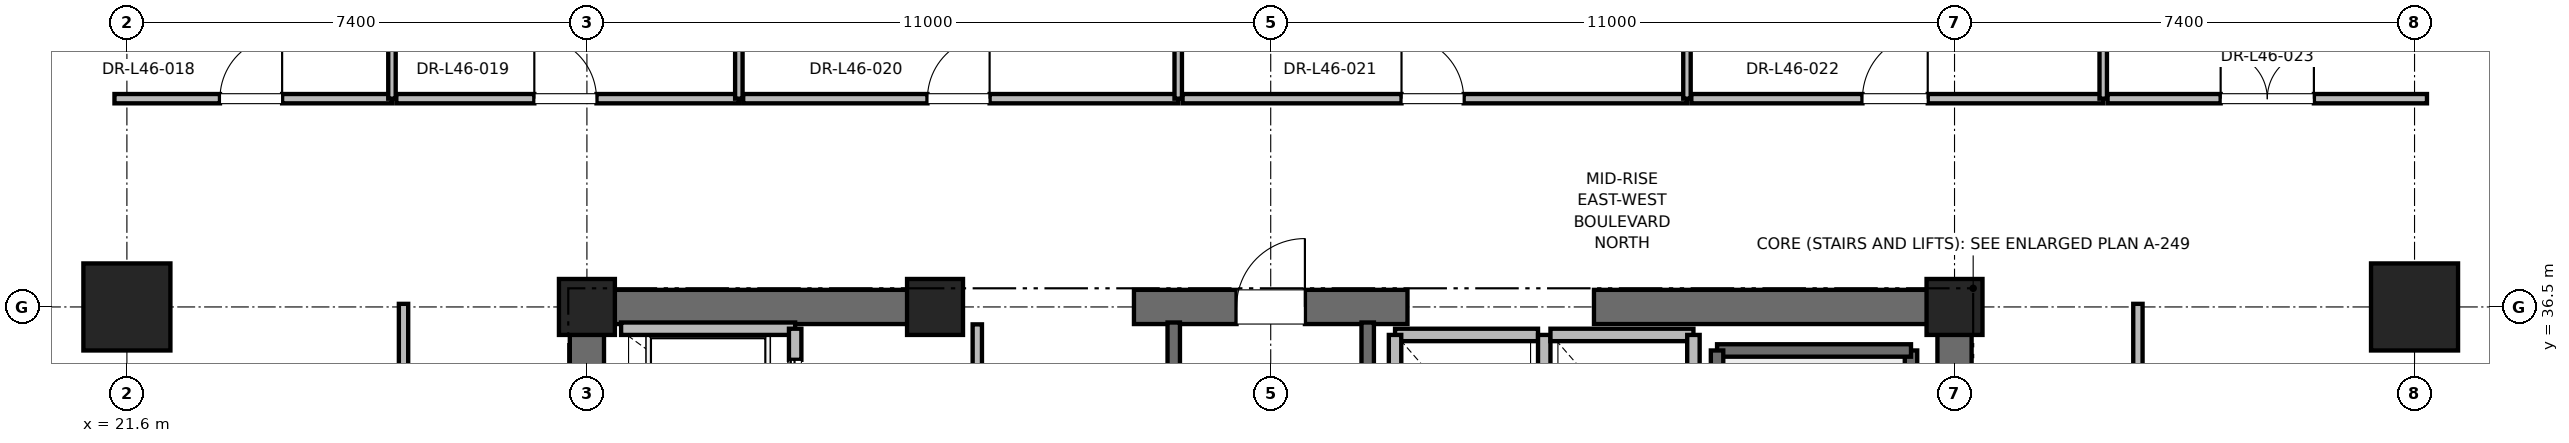
"""IFC4 building model, lengths in metres.
Left out: names, types, materials, properties, quantities, classifications, styles, units other than length and angle.
Written with IfcOpenShell. Run it as: python <this file> out.ifc"""

import sys

from ifc_helpers import new_model, si_unit, direction, frame, frame_2d, origin, origin_2d, place, context, subcontext, project, spatial, rectangle, extrude, element, fill, save


model = new_model("IFC4")
c1 = context("Model", 3, precision=1e-05, world=origin(), true_north=direction((0.0, 1.0)))
c2 = subcontext(c1, "Body", "Model", "MODEL_VIEW")
j1 = project(units=[si_unit("LENGTHUNIT", "METRE"), si_unit("PLANEANGLEUNIT", "RADIAN")], contexts=[c1])
p1 = place(None, origin())
s1 = spatial("IfcSite", under=j1, at=p1, CompositionType="ELEMENT")
p2 = place(p1, origin())
s2 = spatial("IfcBuilding", under=s1, at=p2, CompositionType="ELEMENT")
p3 = place(p2, frame((0.0, 0.0, 200.2)))
s3 = spatial("IfcBuildingStorey", under=s2, at=p3, CompositionType="ELEMENT", Elevation=200.2)
for number, where, z_axis, x_axis in (
    (1, (21.6, 36.5, 0.0), (0.0, 0.0, 1.0), (1.0, 0.0, 0.0)),
    (2, (58.4, 36.5, 0.0), (0.0, 0.0, 1.0), (1.0, 0.0, 0.0)),
):
    element("IfcColumn", number, at=place(p3, frame(where, z_axis=z_axis, x_axis=x_axis)), inside=s3, PredefinedType="COLUMN", context=c2, shape_type="SweptSolid", body=[
        extrude(rectangle(XDim=1.4, YDim=1.4, at=origin_2d()), origin(), (0.0, 0.0, 1.0), 5.0),
    ])
for number, where, z_axis, x_axis in (
    (3, (29.0, 36.5, 0.0), (0.0, 0.0, 1.0), (1.0, 0.0, 0.0)),
    (4, (51.0, 36.5, 0.0), (0.0, 0.0, 1.0), (1.0, 0.0, 0.0)),
    (5, (34.6, 36.5, 0.0), (0.0, 0.0, 1.0), (1.0, 0.0, 0.0)),
):
    element("IfcColumn", number, at=place(p3, frame(where, z_axis=z_axis, x_axis=x_axis)), inside=s3, PredefinedType="PILASTER", context=c2, shape_type="SweptSolid", body=[
        extrude(rectangle(XDim=0.9, YDim=0.9, at=origin_2d()), origin(), (0.0, 0.0, 1.0), 5.0),
    ])
p4 = place(p3, frame((29.0, 36.5, 0.0), z_axis=(0.0, 0.0, 1.0), x_axis=(1.0, 0.0, 0.0)))
e6 = element("IfcWall", 6, at=p4, inside=s3, PredefinedType="SHEAR", context=c2, shape_type="SweptSolid", body=[
    extrude(rectangle(XDim=5.8, YDim=0.55, at=frame_2d((2.9, 0.0))), origin(), (0.0, 0.0, 1.0), 4.775),
])
p5 = place(p3, frame((37.8, 36.5, 0.0), z_axis=(0.0, 0.0, 1.0), x_axis=(1.0, 0.0, 0.0)))
e7 = element("IfcWall", 7, at=p5, inside=s3, PredefinedType="SHEAR", context=c2, shape_type="SweptSolid", body=[
    extrude(rectangle(XDim=4.4, YDim=0.55, at=frame_2d((2.2, 0.0))), origin(), (0.0, 0.0, 1.0), 4.775),
])
p6 = place(p5, frame((1.65, 0.0, 0.0)))
e8 = element("IfcOpeningElement", 8, at=p6, cuts=e7, PredefinedType="OPENING", context=c2, shape_type="SweptSolid", body=[
    extrude(rectangle(XDim=1.1, YDim=2.15, at=frame_2d((0.55, 1.075))), frame((0.0, 0.275, 0.0), z_axis=(0.0, -1.0, 0.0), x_axis=(1.0, 0.0, 0.0)), (0.0, 0.0, 1.0), 0.55),
])
for number, where, z_axis, x_axis in (
    (9, (45.2, 36.5, 0.0), (0.0, 0.0, 1.0), (1.0, 0.0, 0.0)),
    (10, (29.0, 30.7, 0.0), (0.0, 0.0, 1.0), (0.0, 1.0, 0.0)),
):
    element("IfcWall", number, at=place(p3, frame(where, z_axis=z_axis, x_axis=x_axis)), inside=s3, PredefinedType="SHEAR", context=c2, shape_type="SweptSolid", body=[
        extrude(rectangle(XDim=5.8, YDim=0.55, at=frame_2d((2.9, 0.0))), origin(), (0.0, 0.0, 1.0), 4.775),
    ])
p7 = place(p3, frame((51.0, 27.7, 0.0), z_axis=(0.0, 0.0, 1.0), x_axis=(0.0, 1.0, 0.0)))
e11 = element("IfcWall", 11, at=p7, inside=s3, PredefinedType="SHEAR", context=c2, shape_type="SweptSolid", body=[
    extrude(rectangle(XDim=8.8, YDim=0.55, at=frame_2d((4.4, 0.0))), origin(), (0.0, 0.0, 1.0), 4.775),
])
p8 = place(p3, frame((50.3, 27.65, 0.0), z_axis=(0.0, 0.0, 1.0), x_axis=(0.0, 1.0, 0.0)))
e12 = element("IfcWall", 12, at=p8, inside=s3, PredefinedType="SOLIDWALL", context=c2, shape_type="SweptSolid", body=[
    extrude(rectangle(XDim=8.15, YDim=0.2, at=frame_2d((4.075, 0.0))), origin(), (0.0, 0.0, 1.0), 4.775),
])
p9 = place(p3, frame((47.18, 35.8, 0.0), z_axis=(0.0, 0.0, 1.0), x_axis=(1.0, 0.0, 0.0)))
e13 = element("IfcWall", 13, at=p9, inside=s3, PredefinedType="SOLIDWALL", context=c2, shape_type="SweptSolid", body=[
    extrude(rectangle(XDim=3.12, YDim=0.2, at=frame_2d((1.56, 0.0))), origin(), (0.0, 0.0, 1.0), 4.775),
])
p10 = place(p3, frame((47.18, 27.62, 0.0), z_axis=(0.0, 0.0, 1.0), x_axis=(0.0, 1.0, 0.0)))
e14 = element("IfcWall", 14, at=p10, inside=s3, PredefinedType="SOLIDWALL", context=c2, shape_type="SweptSolid", body=[
    extrude(rectangle(XDim=8.18, YDim=0.2, at=frame_2d((4.09, 0.0))), origin(), (0.0, 0.0, 1.0), 4.775),
])
p11 = place(p3, frame((38.44, 27.38, 0.0), z_axis=(0.0, 0.0, 1.0), x_axis=(0.0, 1.0, 0.0)))
e15 = element("IfcWall", 15, at=p11, inside=s3, PredefinedType="SOLIDWALL", context=c2, shape_type="SweptSolid", body=[
    extrude(rectangle(XDim=8.87, YDim=0.2, at=frame_2d((4.435, 0.0))), origin(), (0.0, 0.0, 1.0), 4.775),
])
p12 = place(p3, frame((41.56, 27.68, 0.0), z_axis=(0.0, 0.0, 1.0), x_axis=(0.0, 1.0, 0.0)))
e16 = element("IfcWall", 16, at=p12, inside=s3, PredefinedType="SOLIDWALL", context=c2, shape_type="SweptSolid", body=[
    extrude(rectangle(XDim=8.57, YDim=0.2, at=frame_2d((4.285, 0.0))), origin(), (0.0, 0.0, 1.0), 4.775),
])
p13 = place(p3, frame((32.35, 36.15, 0.0), z_axis=(0.0, 0.0, 1.0), x_axis=(-1.0, 0.0, 0.0)))
e17 = element("IfcWall", 17, at=p13, inside=s3, PredefinedType="SOLIDWALL", context=c2, shape_type="SweptSolid", body=[
    extrude(rectangle(XDim=2.8, YDim=0.2, at=frame_2d((1.4, 0.0))), origin(), (0.0, 0.0, 1.0), 4.062),
])
p14 = place(p3, frame((32.35, 34.05, 0.0), z_axis=(0.0, 0.0, 1.0), x_axis=(0.0, 1.0, 0.0)))
e18 = element("IfcWall", 18, at=p14, inside=s3, PredefinedType="SOLIDWALL", context=c2, shape_type="SweptSolid", body=[
    extrude(rectangle(XDim=2.1, YDim=0.2, at=frame_2d((1.05, 0.0))), origin(), (0.0, 0.0, 1.0), 4.775),
])
p15 = place(p14, frame((0.5, 0.0, 0.0)))
e19 = element("IfcOpeningElement", 19, at=p15, cuts=e18, PredefinedType="OPENING", context=c2, shape_type="SweptSolid", body=[
    extrude(rectangle(XDim=1.1, YDim=2.2, at=frame_2d((0.55, 1.1))), frame((0.0, 0.1, 0.0), z_axis=(0.0, -1.0, 0.0), x_axis=(1.0, 0.0, 0.0)), (0.0, 0.0, 1.0), 0.2),
])
p16 = place(p3, frame((44.3, 36.05, 0.0), z_axis=(0.0, 0.0, 1.0), x_axis=(-1.0, 0.0, 0.0)))
e20 = element("IfcWall", 20, at=p16, inside=s3, PredefinedType="SOLIDWALL", context=c2, shape_type="SweptSolid", body=[
    extrude(rectangle(XDim=2.3, YDim=0.2, at=frame_2d((1.15, 0.0))), origin(), (0.0, 0.0, 1.0), 3.755),
])
for number, where, z_axis, x_axis in (
    (21, (42.0, 36.05, 0.0), (0.0, 0.0, 1.0), (0.0, -1.0, 0.0)),
    (22, (44.4, 33.45, 0.0), (0.0, 0.0, 1.0), (0.0, 1.0, 0.0)),
):
    element("IfcWall", number, at=place(p3, frame(where, z_axis=z_axis, x_axis=x_axis)), inside=s3, PredefinedType="SOLIDWALL", context=c2, shape_type="SweptSolid", body=[
        extrude(rectangle(XDim=2.6, YDim=0.2, at=frame_2d((1.3, 0.0))), origin(), (0.0, 0.0, 1.0), 3.755),
    ])
p17 = place(p3, frame((46.8, 36.05, 0.0), z_axis=(0.0, 0.0, 1.0), x_axis=(-1.0, 0.0, 0.0)))
e23 = element("IfcWall", 23, at=p17, inside=s3, PredefinedType="SOLIDWALL", context=c2, shape_type="SweptSolid", body=[
    extrude(rectangle(XDim=2.3, YDim=0.2, at=frame_2d((1.15, 0.0))), origin(), (0.0, 0.0, 1.0), 3.755),
])
p18 = place(p3, frame((46.8, 33.45, 0.0), z_axis=(0.0, 0.0, 1.0), x_axis=(0.0, 1.0, 0.0)))
e24 = element("IfcWall", 24, at=p18, inside=s3, PredefinedType="SOLIDWALL", context=c2, shape_type="SweptSolid", body=[
    extrude(rectangle(XDim=2.6, YDim=0.2, at=frame_2d((1.3, 0.0))), origin(), (0.0, 0.0, 1.0), 4.775),
])
p19 = place(p3, frame((35.28, 33.95, 0.0), z_axis=(0.0, 0.0, 1.0), x_axis=(0.0, 1.0, 0.0)))
e25 = element("IfcWall", 25, at=p19, inside=s3, PredefinedType="PARTITIONING", context=c2, shape_type="SweptSolid", body=[
    extrude(rectangle(XDim=2.27, YDim=0.15, at=frame_2d((1.135, 0.0))), origin(), (0.0, 0.0, 1.0), 2.85),
])
p20 = place(p19, frame((0.66, 0.0, 0.0)))
e26 = element("IfcOpeningElement", 26, at=p20, cuts=e25, PredefinedType="OPENING", context=c2, shape_type="SweptSolid", body=[
    extrude(rectangle(XDim=0.95, YDim=2.15, at=frame_2d((0.475, 1.075))), frame((0.0, 0.075, 0.0), z_axis=(0.0, -1.0, 0.0), x_axis=(1.0, 0.0, 0.0)), (0.0, 0.0, 1.0), 0.15),
])
p21 = place(p3, frame((21.4, 39.85, 0.0), z_axis=(0.0, 0.0, 1.0), x_axis=(1.0, 0.0, 0.0)))
e27 = element("IfcWall", 27, at=p21, inside=s3, PredefinedType="PARTITIONING", context=c2, shape_type="SweptSolid", body=[
    extrude(rectangle(XDim=4.464, YDim=0.15, at=frame_2d((2.232, 0.0))), origin(), (0.0, 0.0, 1.0), 2.85),
])
p22 = place(p21, frame((1.697, 0.0, 0.0)))
e28 = element("IfcOpeningElement", 28, at=p22, cuts=e27, PredefinedType="OPENING", context=c2, shape_type="SweptSolid", body=[
    extrude(rectangle(XDim=1.0, YDim=2.15, at=frame_2d((0.5, 1.075))), frame((0.0, 0.075, 0.0), z_axis=(0.0, -1.0, 0.0), x_axis=(1.0, 0.0, 0.0)), (0.0, 0.0, 1.0), 0.15),
])
p23 = place(p3, frame((25.864, 39.85, 0.0), z_axis=(0.0, 0.0, 1.0), x_axis=(0.0, 1.0, 0.0)))
e29 = element("IfcWall", 29, at=p23, inside=s3, PredefinedType="PARTITIONING", context=c2, shape_type="SweptSolid", body=[
    extrude(rectangle(XDim=7.75, YDim=0.12, at=frame_2d((3.875, 0.0))), origin(), (0.0, 0.0, 1.0), 2.85),
])
p24 = place(p3, frame((25.934, 39.85, 0.0), z_axis=(0.0, 0.0, 1.0), x_axis=(1.0, 0.0, 0.0)))
e30 = element("IfcWall", 30, at=p24, inside=s3, PredefinedType="PARTITIONING", context=c2, shape_type="SweptSolid", body=[
    extrude(rectangle(XDim=5.51, YDim=0.15, at=frame_2d((2.755, 0.0))), origin(), (0.0, 0.0, 1.0), 2.85),
])
p25 = place(p24, frame((2.22, 0.0, 0.0)))
e31 = element("IfcOpeningElement", 31, at=p25, cuts=e30, PredefinedType="OPENING", context=c2, shape_type="SweptSolid", body=[
    extrude(rectangle(XDim=1.0, YDim=2.15, at=frame_2d((0.5, 1.075))), frame((0.0, 0.075, 0.0), z_axis=(0.0, -1.0, 0.0), x_axis=(1.0, 0.0, 0.0)), (0.0, 0.0, 1.0), 0.15),
])
p26 = place(p3, frame((31.444, 39.85, 0.0), z_axis=(0.0, 0.0, 1.0), x_axis=(0.0, 1.0, 0.0)))
e32 = element("IfcWall", 32, at=p26, inside=s3, PredefinedType="PARTITIONING", context=c2, shape_type="SweptSolid", body=[
    extrude(rectangle(XDim=7.75, YDim=0.12, at=frame_2d((3.875, 0.0))), origin(), (0.0, 0.0, 1.0), 2.85),
])
p27 = place(p3, frame((31.514, 39.85, 0.0), z_axis=(0.0, 0.0, 1.0), x_axis=(1.0, 0.0, 0.0)))
e33 = element("IfcWall", 33, at=p27, inside=s3, PredefinedType="PARTITIONING", context=c2, shape_type="SweptSolid", body=[
    extrude(rectangle(XDim=6.998, YDim=0.15, at=frame_2d((3.499, 0.0))), origin(), (0.0, 0.0, 1.0), 2.85),
])
p28 = place(p27, frame((2.964, 0.0, 0.0)))
e34 = element("IfcOpeningElement", 34, at=p28, cuts=e33, PredefinedType="OPENING", context=c2, shape_type="SweptSolid", body=[
    extrude(rectangle(XDim=1.0, YDim=2.15, at=frame_2d((0.5, 1.075))), frame((0.0, 0.075, 0.0), z_axis=(0.0, -1.0, 0.0), x_axis=(1.0, 0.0, 0.0)), (0.0, 0.0, 1.0), 0.15),
])
p29 = place(p3, frame((38.512, 39.85, 0.0), z_axis=(0.0, 0.0, 1.0), x_axis=(0.0, 1.0, 0.0)))
e35 = element("IfcWall", 35, at=p29, inside=s3, PredefinedType="PARTITIONING", context=c2, shape_type="SweptSolid", body=[
    extrude(rectangle(XDim=7.75, YDim=0.12, at=frame_2d((3.875, 0.0))), origin(), (0.0, 0.0, 1.0), 2.85),
])
p30 = place(p3, frame((38.582, 39.85, 0.0), z_axis=(0.0, 0.0, 1.0), x_axis=(1.0, 0.0, 0.0)))
e36 = element("IfcWall", 36, at=p30, inside=s3, PredefinedType="PARTITIONING", context=c2, shape_type="SweptSolid", body=[
    extrude(rectangle(XDim=8.114, YDim=0.15, at=frame_2d((4.057, 0.0))), origin(), (0.0, 0.0, 1.0), 2.85),
])
p31 = place(p30, frame((3.522, 0.0, 0.0)))
e37 = element("IfcOpeningElement", 37, at=p31, cuts=e36, PredefinedType="OPENING", context=c2, shape_type="SweptSolid", body=[
    extrude(rectangle(XDim=1.0, YDim=2.15, at=frame_2d((0.5, 1.075))), frame((0.0, 0.075, 0.0), z_axis=(0.0, -1.0, 0.0), x_axis=(1.0, 0.0, 0.0)), (0.0, 0.0, 1.0), 0.15),
])
p32 = place(p3, frame((46.696, 39.85, 0.0), z_axis=(0.0, 0.0, 1.0), x_axis=(0.0, 1.0, 0.0)))
e38 = element("IfcWall", 38, at=p32, inside=s3, PredefinedType="PARTITIONING", context=c2, shape_type="SweptSolid", body=[
    extrude(rectangle(XDim=7.75, YDim=0.12, at=frame_2d((3.875, 0.0))), origin(), (0.0, 0.0, 1.0), 2.85),
])
p33 = place(p3, frame((46.766, 39.85, 0.0), z_axis=(0.0, 0.0, 1.0), x_axis=(1.0, 0.0, 0.0)))
e39 = element("IfcWall", 39, at=p33, inside=s3, PredefinedType="PARTITIONING", context=c2, shape_type="SweptSolid", body=[
    extrude(rectangle(XDim=6.626, YDim=0.15, at=frame_2d((3.313, 0.0))), origin(), (0.0, 0.0, 1.0), 2.85),
])
p34 = place(p33, frame((2.753, 0.0, 0.0)))
e40 = element("IfcOpeningElement", 40, at=p34, cuts=e39, PredefinedType="OPENING", context=c2, shape_type="SweptSolid", body=[
    extrude(rectangle(XDim=1.05, YDim=2.2, at=frame_2d((0.525, 1.1))), frame((0.0, 0.075, 0.0), z_axis=(0.0, -1.0, 0.0), x_axis=(1.0, 0.0, 0.0)), (0.0, 0.0, 1.0), 0.15),
])
p35 = place(p3, frame((53.392, 39.85, 0.0), z_axis=(0.0, 0.0, 1.0), x_axis=(0.0, 1.0, 0.0)))
e41 = element("IfcWall", 41, at=p35, inside=s3, PredefinedType="PARTITIONING", context=c2, shape_type="SweptSolid", body=[
    extrude(rectangle(XDim=7.75, YDim=0.12, at=frame_2d((3.875, 0.0))), origin(), (0.0, 0.0, 1.0), 2.85),
])
p36 = place(p3, frame((53.462, 39.85, 0.0), z_axis=(0.0, 0.0, 1.0), x_axis=(1.0, 0.0, 0.0)))
e42 = element("IfcWall", 42, at=p36, inside=s3, PredefinedType="PARTITIONING", context=c2, shape_type="SweptSolid", body=[
    extrude(rectangle(XDim=5.138, YDim=0.15, at=frame_2d((2.569, 0.0))), origin(), (0.0, 0.0, 1.0), 2.85),
])
p37 = place(p36, frame((1.819, 0.0, 0.0)))
e43 = element("IfcOpeningElement", 43, at=p37, cuts=e42, PredefinedType="OPENING", context=c2, shape_type="SweptSolid", body=[
    extrude(rectangle(XDim=1.5, YDim=2.25, at=frame_2d((0.75, 1.125))), frame((0.0, 0.075, 0.0), z_axis=(0.0, -1.0, 0.0), x_axis=(1.0, 0.0, 0.0)), (0.0, 0.0, 1.0), 0.15),
])
p38 = place(p3, frame((26.05, 30.647, 0.0), z_axis=(0.0, 0.0, 1.0), x_axis=(0.0, 1.0, 0.0)))
e44 = element("IfcWall", 44, at=p38, inside=s3, PredefinedType="PARTITIONING", context=c2, shape_type="SweptSolid", body=[
    extrude(rectangle(XDim=5.903, YDim=0.15, at=frame_2d((2.952, 0.0))), origin(), (0.0, 0.0, 1.0), 2.85),
])
p39 = place(p38, frame((2.126, 0.0, 0.0)))
e45 = element("IfcOpeningElement", 45, at=p39, cuts=e44, PredefinedType="OPENING", context=c2, shape_type="SweptSolid", body=[
    extrude(rectangle(XDim=1.5, YDim=2.25, at=frame_2d((0.75, 1.125))), frame((0.0, 0.075, 0.0), z_axis=(0.0, -1.0, 0.0), x_axis=(1.0, 0.0, 0.0)), (0.0, 0.0, 1.0), 0.15),
])
p40 = place(p3, frame((53.95, 32.819, 0.0), z_axis=(0.0, 0.0, 1.0), x_axis=(0.0, 1.0, 0.0)))
e46 = element("IfcWall", 46, at=p40, inside=s3, PredefinedType="PARTITIONING", context=c2, shape_type="SweptSolid", body=[
    extrude(rectangle(XDim=3.731, YDim=0.15, at=frame_2d((1.865, 0.0))), origin(), (0.0, 0.0, 1.0), 2.85),
])
p41 = place(p40, frame((1.291, 0.0, 0.0)))
e47 = element("IfcOpeningElement", 47, at=p41, cuts=e46, PredefinedType="OPENING", context=c2, shape_type="SweptSolid", body=[
    extrude(rectangle(XDim=1.0, YDim=2.15, at=frame_2d((0.5, 1.075))), frame((0.0, 0.075, 0.0), z_axis=(0.0, -1.0, 0.0), x_axis=(1.0, 0.0, 0.0)), (0.0, 0.0, 1.0), 0.15),
])
p42 = place(p6, origin())
e48 = element("IfcDoor", 48, at=p42, inside=s3, OperationType="SINGLE_SWING_RIGHT", PredefinedType="DOOR", context=c2, shape_type="SweptSolid", body=[
    extrude(rectangle(XDim=1.1, YDim=2.15, at=frame_2d((0.55, 1.075))), frame((0.0, 0.025, 0.0), z_axis=(0.0, -1.0, 0.0), x_axis=(1.0, 0.0, 0.0)), (0.0, 0.0, 1.0), 0.05),
])
fill(e8, e48)
p43 = place(p15, origin())
e49 = element("IfcDoor", 49, at=p43, inside=s3, OperationType="SLIDING_TO_RIGHT", PredefinedType="DOOR", context=c2, shape_type="SweptSolid", body=[
    extrude(rectangle(XDim=1.1, YDim=2.2, at=frame_2d((0.55, 1.1))), frame((0.0, 0.025, 0.0), z_axis=(0.0, -1.0, 0.0), x_axis=(1.0, 0.0, 0.0)), (0.0, 0.0, 1.0), 0.05),
])
fill(e19, e49)
p44 = place(p22, origin())
e50 = element("IfcDoor", 50, at=p44, inside=s3, OperationType="SINGLE_SWING_RIGHT", PredefinedType="DOOR", context=c2, shape_type="SweptSolid", body=[
    extrude(rectangle(XDim=1.0, YDim=2.15, at=frame_2d((0.5, 1.075))), frame((0.0, 0.025, 0.0), z_axis=(0.0, -1.0, 0.0), x_axis=(1.0, 0.0, 0.0)), (0.0, 0.0, 1.0), 0.05),
])
fill(e28, e50)
p45 = place(p25, origin())
e51 = element("IfcDoor", 51, at=p45, inside=s3, OperationType="SINGLE_SWING_LEFT", PredefinedType="DOOR", context=c2, shape_type="SweptSolid", body=[
    extrude(rectangle(XDim=1.0, YDim=2.15, at=frame_2d((0.5, 1.075))), frame((0.0, 0.025, 0.0), z_axis=(0.0, -1.0, 0.0), x_axis=(1.0, 0.0, 0.0)), (0.0, 0.0, 1.0), 0.05),
])
fill(e31, e51)
p46 = place(p28, origin())
e52 = element("IfcDoor", 52, at=p46, inside=s3, OperationType="SINGLE_SWING_RIGHT", PredefinedType="DOOR", context=c2, shape_type="SweptSolid", body=[
    extrude(rectangle(XDim=1.0, YDim=2.15, at=frame_2d((0.5, 1.075))), frame((0.0, 0.025, 0.0), z_axis=(0.0, -1.0, 0.0), x_axis=(1.0, 0.0, 0.0)), (0.0, 0.0, 1.0), 0.05),
])
fill(e34, e52)
p47 = place(p31, origin())
e53 = element("IfcDoor", 53, at=p47, inside=s3, OperationType="SINGLE_SWING_LEFT", PredefinedType="DOOR", context=c2, shape_type="SweptSolid", body=[
    extrude(rectangle(XDim=1.0, YDim=2.15, at=frame_2d((0.5, 1.075))), frame((0.0, 0.025, 0.0), z_axis=(0.0, -1.0, 0.0), x_axis=(1.0, 0.0, 0.0)), (0.0, 0.0, 1.0), 0.05),
])
fill(e37, e53)
p48 = place(p34, origin())
e54 = element("IfcDoor", 54, at=p48, inside=s3, OperationType="SINGLE_SWING_RIGHT", PredefinedType="DOOR", context=c2, shape_type="SweptSolid", body=[
    extrude(rectangle(XDim=1.05, YDim=2.2, at=frame_2d((0.525, 1.1))), frame((0.0, 0.025, 0.0), z_axis=(0.0, -1.0, 0.0), x_axis=(1.0, 0.0, 0.0)), (0.0, 0.0, 1.0), 0.05),
])
fill(e40, e54)
p49 = place(p37, origin())
e55 = element("IfcDoor", 55, at=p49, inside=s3, OperationType="DOUBLE_DOOR_SINGLE_SWING", PredefinedType="DOOR", context=c2, shape_type="SweptSolid", body=[
    extrude(rectangle(XDim=1.5, YDim=2.25, at=frame_2d((0.75, 1.125))), frame((0.0, 0.025, 0.0), z_axis=(0.0, -1.0, 0.0), x_axis=(1.0, 0.0, 0.0)), (0.0, 0.0, 1.0), 0.05),
])
fill(e43, e55)
save(model, sys.argv[1])
